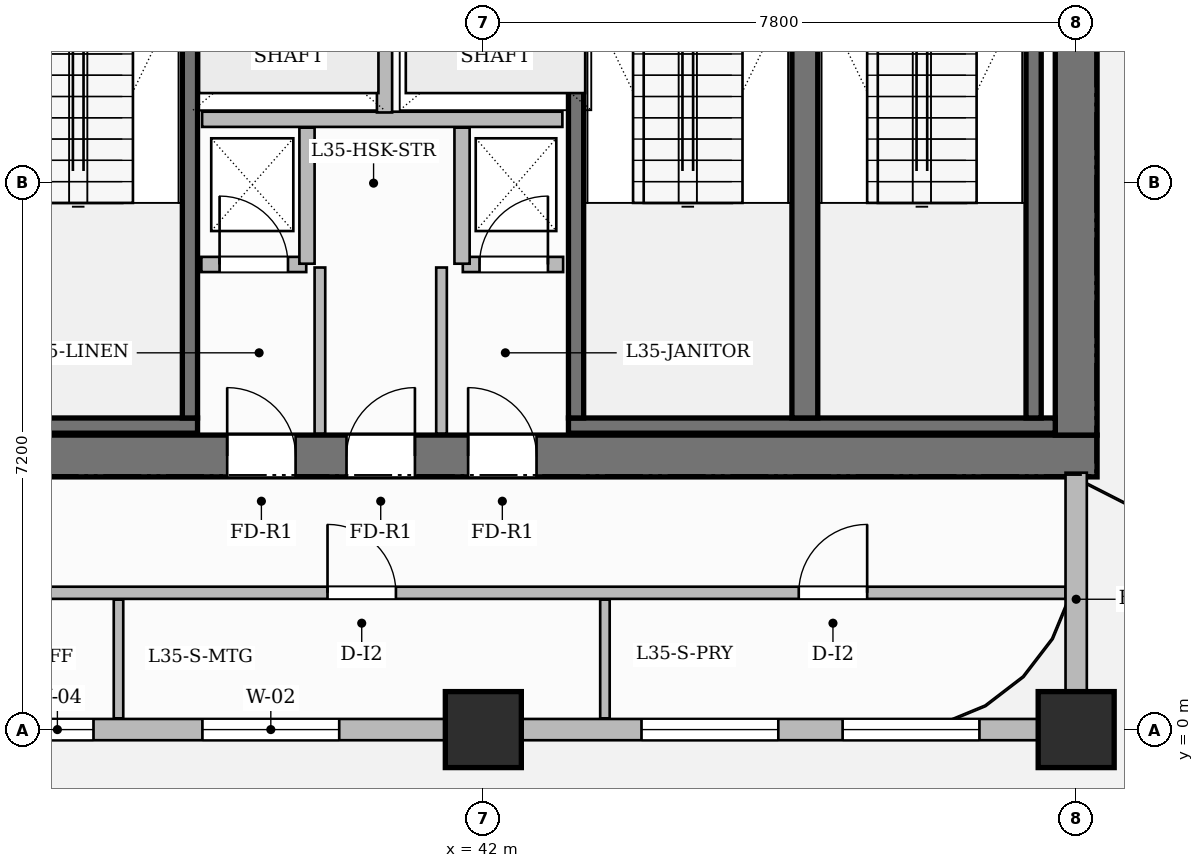
"""IFC4 building model, lengths in metres.
Left out: names, types, materials, properties, quantities, classifications, styles, units other than length and angle.
Written with IfcOpenShell. Run it as: python <this file> out.ifc"""

import sys

from ifc_helpers import new_model, si_unit, direction, frame, frame_2d, origin, origin_2d, place, context, subcontext, project, spatial, rectangle, extrude, source, transform, mapped, element, fill, save


model = new_model("IFC4")
c1 = context("Model", 3, precision=1e-05, world=origin(), true_north=direction((0.0, 1.0)))
c2 = subcontext(c1, "Body", "Model", "MODEL_VIEW")
j1 = project(units=[si_unit("LENGTHUNIT", "METRE"), si_unit("PLANEANGLEUNIT", "RADIAN")], contexts=[c1])
p1 = place(None, origin())
s1 = spatial("IfcSite", under=j1, at=p1, CompositionType="ELEMENT")
p2 = place(p1, origin())
s2 = spatial("IfcBuilding", under=s1, at=p2, CompositionType="ELEMENT")
p3 = place(p2, frame((0.0, 0.0, 141.4)))
s3 = spatial("IfcBuildingStorey", under=s2, at=p3, CompositionType="ELEMENT", Elevation=141.4)
p4 = place(p3, frame((34.525, 3.6, 0.0), z_axis=(0.0, 0.0, 1.0), x_axis=(1.0, 0.0, 0.0)))
e1 = element("IfcWall", 1, at=p4, inside=s3, PredefinedType="SHEAR", context=c2, shape_type="SweptSolid", body=[
    extrude(rectangle(XDim=15.55, YDim=0.55, at=frame_2d((7.775, 0.0))), origin(), (0.0, 0.0, 1.0), 3.7),
])
p5 = place(p4, frame((4.105, 0.0, 0.0)))
e2 = element("IfcOpeningElement", 2, at=p5, cuts=e1, PredefinedType="OPENING", context=c2, shape_type="SweptSolid", body=[
    extrude(rectangle(XDim=0.9, YDim=2.1, at=frame_2d((0.45, 1.05))), frame((0.0, 0.285, 0.0), z_axis=(0.0, -1.0, 0.0), x_axis=(1.0, 0.0, 0.0)), (0.0, 0.0, 1.0), 0.57),
])
p6 = place(p4, frame((5.675, 0.0, 0.0)))
e3 = element("IfcOpeningElement", 3, at=p6, cuts=e1, PredefinedType="OPENING", context=c2, shape_type="SweptSolid", body=[
    extrude(rectangle(XDim=0.9, YDim=2.1, at=frame_2d((0.45, 1.05))), frame((0.0, 0.285, 0.0), z_axis=(0.0, -1.0, 0.0), x_axis=(1.0, 0.0, 0.0)), (0.0, 0.0, 1.0), 0.57),
])
p7 = place(p4, frame((7.275, 0.0, 0.0)))
e4 = element("IfcOpeningElement", 4, at=p7, cuts=e1, PredefinedType="OPENING", context=c2, shape_type="SweptSolid", body=[
    extrude(rectangle(XDim=0.9, YDim=2.1, at=frame_2d((0.45, 1.05))), frame((0.0, 0.285, 0.0), z_axis=(0.0, -1.0, 0.0), x_axis=(1.0, 0.0, 0.0)), (0.0, 0.0, 1.0), 0.57),
])
p8 = place(p3, frame((49.8, 3.875, 0.0), z_axis=(0.0, 0.0, 1.0), x_axis=(0.0, 1.0, 0.0)))
e5 = element("IfcWall", 5, at=p8, inside=s3, PredefinedType="SHEAR", context=c2, shape_type="SweptSolid", body=[
    extrude(rectangle(XDim=10.25, YDim=0.55, at=frame_2d((5.125, 0.0))), origin(), (0.0, 0.0, 1.0), 3.7),
])
m1 = source(origin(), c2, "Body", "SweptSolid", [
    extrude(rectangle(XDim=1.0, YDim=1.0, at=origin_2d()), origin(), (0.0, 0.0, 1.0), 3.7),
])
for number, where, z_axis, x_axis in (
    (6, (42.0, 0.0, 0.0), (0.0, 0.0, 1.0), (1.0, 0.0, 0.0)),
    (7, (49.8, 0.0, 0.0), (0.0, 0.0, 1.0), (1.0, 0.0, 0.0)),
):
    element("IfcColumn", number, at=place(p3, frame(where, z_axis=z_axis, x_axis=x_axis)), inside=s3, PredefinedType="COLUMN", context=c2, shape_type="MappedRepresentation", body=[
        mapped(m1, transform((0.0, 0.0, 0.0), scale=1.0)),
    ])
p9 = place(p3, frame((35.075, 4.0, 0.0), z_axis=(0.0, 0.0, 1.0), x_axis=(1.0, 0.0, 0.0)))
e8 = element("IfcWall", 8, at=p9, inside=s3, PredefinedType="SHEAR", context=c2, shape_type="SweptSolid", body=[
    extrude(rectangle(XDim=3.165, YDim=0.2, at=frame_2d((1.583, 0.0))), origin(), (0.0, 0.0, 1.0), 3.7),
])
p10 = place(p3, frame((38.14, 4.1, 0.0), z_axis=(0.0, 0.0, 1.0), x_axis=(0.0, 1.0, 0.0)))
e9 = element("IfcWall", 9, at=p10, inside=s3, PredefinedType="SHEAR", context=c2, shape_type="SweptSolid", body=[
    extrude(rectangle(XDim=6.95, YDim=0.2, at=frame_2d((3.475, 0.0))), origin(), (0.0, 0.0, 1.0), 3.7),
])
p11 = place(p3, frame((43.12, 4.0, 0.0), z_axis=(0.0, 0.0, 1.0), x_axis=(1.0, 0.0, 0.0)))
e10 = element("IfcWall", 10, at=p11, inside=s3, PredefinedType="SHEAR", context=c2, shape_type="SweptSolid", body=[
    extrude(rectangle(XDim=6.405, YDim=0.2, at=frame_2d((3.202, 0.0))), origin(), (0.0, 0.0, 1.0), 3.7),
])
p12 = place(p3, frame((43.22, 4.1, 0.0), z_axis=(0.0, 0.0, 1.0), x_axis=(0.0, 1.0, 0.0)))
e11 = element("IfcWall", 11, at=p12, inside=s3, PredefinedType="SHEAR", context=c2, shape_type="SweptSolid", body=[
    extrude(rectangle(XDim=6.95, YDim=0.2, at=frame_2d((3.475, 0.0))), origin(), (0.0, 0.0, 1.0), 3.7),
])
p13 = place(p3, frame((46.23, 4.1, 0.0), z_axis=(0.0, 0.0, 1.0), x_axis=(0.0, 1.0, 0.0)))
e12 = element("IfcWall", 12, at=p13, inside=s3, PredefinedType="SHEAR", context=c2, shape_type="SweptSolid", body=[
    extrude(rectangle(XDim=6.95, YDim=0.34, at=frame_2d((3.475, 0.0))), origin(), (0.0, 0.0, 1.0), 3.7),
])
p14 = place(p3, frame((49.24, 4.1, 0.0), z_axis=(0.0, 0.0, 1.0), x_axis=(0.0, 1.0, 0.0)))
e13 = element("IfcWall", 13, at=p14, inside=s3, PredefinedType="SHEAR", context=c2, shape_type="SweptSolid", body=[
    extrude(rectangle(XDim=6.95, YDim=0.2, at=frame_2d((3.475, 0.0))), origin(), (0.0, 0.0, 1.0), 3.7),
])
p15 = place(p3, frame((38.3, 8.03, 0.0), z_axis=(0.0, 0.0, 1.0), x_axis=(1.0, 0.0, 0.0)))
e14 = element("IfcWall", 14, at=p15, inside=s3, PredefinedType="PARTITIONING", context=c2, shape_type="SweptSolid", body=[
    extrude(rectangle(XDim=4.74, YDim=0.2, at=frame_2d((2.37, 0.0))), origin(), (0.0, 0.0, 1.0), 3.4),
])
p16 = place(p3, frame((40.7, 8.12, 0.0), z_axis=(0.0, 0.0, 1.0), x_axis=(0.0, 1.0, 0.0)))
e15 = element("IfcWall", 15, at=p16, inside=s3, PredefinedType="PARTITIONING", context=c2, shape_type="SweptSolid", body=[
    extrude(rectangle(XDim=2.18, YDim=0.2, at=frame_2d((1.09, 0.0))), origin(), (0.0, 0.0, 1.0), 3.4),
])
p17 = place(p3, frame((38.29, 6.12, 0.0), z_axis=(0.0, 0.0, 1.0), x_axis=(1.0, 0.0, 0.0)))
e16 = element("IfcWall", 16, at=p17, inside=s3, PredefinedType="PARTITIONING", context=c2, shape_type="SweptSolid", body=[
    extrude(rectangle(XDim=1.38, YDim=0.2, at=frame_2d((0.69, 0.0))), origin(), (0.0, 0.0, 1.0), 3.4),
])
p18 = place(p17, frame((0.24, 0.0, 0.0)))
e17 = element("IfcOpeningElement", 17, at=p18, cuts=e16, PredefinedType="OPENING", context=c2, shape_type="SweptSolid", body=[
    extrude(rectangle(XDim=0.9, YDim=2.1, at=frame_2d((0.45, 1.05))), frame((0.0, 0.11, 0.0), z_axis=(0.0, -1.0, 0.0), x_axis=(1.0, 0.0, 0.0)), (0.0, 0.0, 1.0), 0.22),
])
p19 = place(p3, frame((39.68, 6.13, 0.0), z_axis=(0.0, 0.0, 1.0), x_axis=(0.0, 1.0, 0.0)))
e18 = element("IfcWall", 18, at=p19, inside=s3, PredefinedType="PARTITIONING", context=c2, shape_type="SweptSolid", body=[
    extrude(rectangle(XDim=1.79, YDim=0.2, at=frame_2d((0.895, 0.0))), origin(), (0.0, 0.0, 1.0), 3.4),
])
p20 = place(p3, frame((41.73, 6.12, 0.0), z_axis=(0.0, 0.0, 1.0), x_axis=(1.0, 0.0, 0.0)))
e19 = element("IfcWall", 19, at=p20, inside=s3, PredefinedType="PARTITIONING", context=c2, shape_type="SweptSolid", body=[
    extrude(rectangle(XDim=1.32, YDim=0.2, at=frame_2d((0.66, 0.0))), origin(), (0.0, 0.0, 1.0), 3.4),
])
p21 = place(p20, frame((0.22, 0.0, 0.0)))
e20 = element("IfcOpeningElement", 20, at=p21, cuts=e19, PredefinedType="OPENING", context=c2, shape_type="SweptSolid", body=[
    extrude(rectangle(XDim=0.9, YDim=2.1, at=frame_2d((0.45, 1.05))), frame((0.0, 0.11, 0.0), z_axis=(0.0, -1.0, 0.0), x_axis=(1.0, 0.0, 0.0)), (0.0, 0.0, 1.0), 0.22),
])
p22 = place(p3, frame((41.72, 6.13, 0.0), z_axis=(0.0, 0.0, 1.0), x_axis=(0.0, 1.0, 0.0)))
e21 = element("IfcWall", 21, at=p22, inside=s3, PredefinedType="PARTITIONING", context=c2, shape_type="SweptSolid", body=[
    extrude(rectangle(XDim=1.79, YDim=0.2, at=frame_2d((0.895, 0.0))), origin(), (0.0, 0.0, 1.0), 3.4),
])
for number, where, z_axis, x_axis in (
    (22, (39.85, 3.895, 0.0), (0.0, 0.0, 1.0), (0.0, 1.0, 0.0)),
    (23, (41.45, 3.895, 0.0), (0.0, 0.0, 1.0), (0.0, 1.0, 0.0)),
):
    element("IfcWall", number, at=place(p3, frame(where, z_axis=z_axis, x_axis=x_axis)), inside=s3, PredefinedType="PARTITIONING", context=c2, shape_type="SweptSolid", body=[
        extrude(rectangle(XDim=2.185, YDim=0.14, at=frame_2d((1.093, 0.0))), origin(), (0.0, 0.0, 1.0), 3.4),
    ])
p23 = place(p3, frame((30.29, 1.8, 0.0), z_axis=(0.0, 0.0, 1.0), x_axis=(1.0, 0.0, 0.0)))
e24 = element("IfcWall", 24, at=p23, inside=s3, PredefinedType="PARTITIONING", context=c2, shape_type="SweptSolid", body=[
    extrude(rectangle(XDim=19.37, YDim=0.16, at=frame_2d((9.685, 0.0))), origin(), (0.0, 0.0, 1.0), 3.4),
])
p24 = place(p23, frame((2.916, 0.0, 0.0)))
e25 = element("IfcOpeningElement", 25, at=p24, cuts=e24, PredefinedType="OPENING", context=c2, shape_type="SweptSolid", body=[
    extrude(rectangle(XDim=0.9, YDim=2.15, at=frame_2d((0.45, 1.075))), frame((0.0, 0.09, 0.0), z_axis=(0.0, -1.0, 0.0), x_axis=(1.0, 0.0, 0.0)), (0.0, 0.0, 1.0), 0.18),
])
p25 = place(p23, frame((9.66, 0.0, 0.0)))
e26 = element("IfcOpeningElement", 26, at=p25, cuts=e24, PredefinedType="OPENING", context=c2, shape_type="SweptSolid", body=[
    extrude(rectangle(XDim=0.9, YDim=2.15, at=frame_2d((0.45, 1.075))), frame((0.0, 0.09, 0.0), z_axis=(0.0, -1.0, 0.0), x_axis=(1.0, 0.0, 0.0)), (0.0, 0.0, 1.0), 0.18),
])
p26 = place(p23, frame((15.86, 0.0, 0.0)))
e27 = element("IfcOpeningElement", 27, at=p26, cuts=e24, PredefinedType="OPENING", context=c2, shape_type="SweptSolid", body=[
    extrude(rectangle(XDim=0.9, YDim=2.15, at=frame_2d((0.45, 1.075))), frame((0.0, 0.09, 0.0), z_axis=(0.0, -1.0, 0.0), x_axis=(1.0, 0.0, 0.0)), (0.0, 0.0, 1.0), 0.18),
])
for number, where, z_axis, x_axis in (
    (28, (37.2, 0.148, 0.0), (0.0, 0.0, 1.0), (0.0, 1.0, 0.0)),
    (29, (43.6, 0.148, 0.0), (0.0, 0.0, 1.0), (0.0, 1.0, 0.0)),
):
    element("IfcWall", number, at=place(p3, frame(where, z_axis=z_axis, x_axis=x_axis)), inside=s3, PredefinedType="PARTITIONING", context=c2, shape_type="SweptSolid", body=[
        extrude(rectangle(XDim=1.562, YDim=0.125, at=frame_2d((0.781, 0.0))), origin(), (0.0, 0.0, 1.0), 3.4),
    ])
p27 = place(p3, frame((14.4, 0.0, 0.0), z_axis=(0.0, 0.0, 1.0), x_axis=(1.0, 0.0, 0.0)))
e30 = element("IfcWall", 30, at=p27, inside=s3, PredefinedType="SOLIDWALL", context=c2, shape_type="SweptSolid", body=[
    extrude(rectangle(XDim=35.4, YDim=0.28, at=frame_2d((17.7, 0.0))), origin(), (0.0, 0.0, 1.0), 2.885),
])
p28 = place(p27, frame((0.85, 0.0, 0.0)))
e31 = element("IfcOpeningElement", 31, at=p28, cuts=e30, PredefinedType="OPENING", context=c2, shape_type="SweptSolid", body=[
    extrude(rectangle(XDim=1.2, YDim=2.2, at=frame_2d((0.6, 1.1))), frame((0.0, 0.15, 0.0), z_axis=(0.0, -1.0, 0.0), x_axis=(1.0, 0.0, 0.0)), (0.0, 0.0, 1.0), 0.3),
])
p29 = place(p27, frame((4.154, 0.0, 0.8)))
e32 = element("IfcOpeningElement", 32, at=p29, cuts=e30, PredefinedType="OPENING", context=c2, shape_type="SweptSolid", body=[
    extrude(rectangle(XDim=1.8, YDim=1.85, at=frame_2d((0.9, 0.925))), frame((0.0, 0.15, 0.0), z_axis=(0.0, -1.0, 0.0), x_axis=(1.0, 0.0, 0.0)), (0.0, 0.0, 1.0), 0.3),
])
p30 = place(p27, frame((8.181, 0.0, 0.8)))
e33 = element("IfcOpeningElement", 33, at=p30, cuts=e30, PredefinedType="OPENING", context=c2, shape_type="SweptSolid", body=[
    extrude(rectangle(XDim=0.95, YDim=1.75, at=frame_2d((0.475, 0.875))), frame((0.0, 0.15, 0.0), z_axis=(0.0, -1.0, 0.0), x_axis=(1.0, 0.0, 0.0)), (0.0, 0.0, 1.0), 0.3),
])
p31 = place(p27, frame((9.9, 0.0, 0.8)))
e34 = element("IfcOpeningElement", 34, at=p31, cuts=e30, PredefinedType="OPENING", context=c2, shape_type="SweptSolid", body=[
    extrude(rectangle(XDim=1.8, YDim=1.85, at=frame_2d((0.9, 0.925))), frame((0.0, 0.15, 0.0), z_axis=(0.0, -1.0, 0.0), x_axis=(1.0, 0.0, 0.0)), (0.0, 0.0, 1.0), 0.3),
])
p32 = place(p27, frame((12.469, 0.0, 0.8)))
e35 = element("IfcOpeningElement", 35, at=p32, cuts=e30, PredefinedType="OPENING", context=c2, shape_type="SweptSolid", body=[
    extrude(rectangle(XDim=0.95, YDim=1.75, at=frame_2d((0.475, 0.875))), frame((0.0, 0.15, 0.0), z_axis=(0.0, -1.0, 0.0), x_axis=(1.0, 0.0, 0.0)), (0.0, 0.0, 1.0), 0.3),
])
p33 = place(p27, frame((16.804, 0.0, 0.8)))
e36 = element("IfcOpeningElement", 36, at=p33, cuts=e30, PredefinedType="OPENING", context=c2, shape_type="SweptSolid", body=[
    extrude(rectangle(XDim=1.8, YDim=1.85, at=frame_2d((0.9, 0.925))), frame((0.0, 0.15, 0.0), z_axis=(0.0, -1.0, 0.0), x_axis=(1.0, 0.0, 0.0)), (0.0, 0.0, 1.0), 0.3),
])
p34 = place(p27, frame((21.521, 0.0, 0.8)))
e37 = element("IfcOpeningElement", 37, at=p34, cuts=e30, PredefinedType="OPENING", context=c2, shape_type="SweptSolid", body=[
    extrude(rectangle(XDim=0.95, YDim=1.75, at=frame_2d((0.475, 0.875))), frame((0.0, 0.15, 0.0), z_axis=(0.0, -1.0, 0.0), x_axis=(1.0, 0.0, 0.0)), (0.0, 0.0, 1.0), 0.3),
])
p35 = place(p27, frame((23.904, 0.0, 0.8)))
e38 = element("IfcOpeningElement", 38, at=p35, cuts=e30, PredefinedType="OPENING", context=c2, shape_type="SweptSolid", body=[
    extrude(rectangle(XDim=1.8, YDim=1.85, at=frame_2d((0.9, 0.925))), frame((0.0, 0.15, 0.0), z_axis=(0.0, -1.0, 0.0), x_axis=(1.0, 0.0, 0.0)), (0.0, 0.0, 1.0), 0.3),
])
p36 = place(p27, frame((29.681, 0.0, 0.8)))
e39 = element("IfcOpeningElement", 39, at=p36, cuts=e30, PredefinedType="OPENING", context=c2, shape_type="SweptSolid", body=[
    extrude(rectangle(XDim=1.8, YDim=1.85, at=frame_2d((0.9, 0.925))), frame((0.0, 0.15, 0.0), z_axis=(0.0, -1.0, 0.0), x_axis=(1.0, 0.0, 0.0)), (0.0, 0.0, 1.0), 0.3),
])
p37 = place(p27, frame((32.327, 0.0, 0.8)))
e40 = element("IfcOpeningElement", 40, at=p37, cuts=e30, PredefinedType="OPENING", context=c2, shape_type="SweptSolid", body=[
    extrude(rectangle(XDim=1.8, YDim=1.85, at=frame_2d((0.9, 0.925))), frame((0.0, 0.15, 0.0), z_axis=(0.0, -1.0, 0.0), x_axis=(1.0, 0.0, 0.0)), (0.0, 0.0, 1.0), 0.3),
])
p38 = place(p3, frame((49.8, 0.05, 0.0), z_axis=(0.0, 0.0, 1.0), x_axis=(0.0, 1.0, 0.0)))
e41 = element("IfcWall", 41, at=p38, inside=s3, PredefinedType="SOLIDWALL", context=c2, shape_type="SweptSolid", body=[
    extrude(rectangle(XDim=3.33, YDim=0.28, at=frame_2d((1.665, 0.0))), origin(), (0.0, 0.0, 1.0), 3.4),
])
m2 = source(origin(), c2, "Body", "SweptSolid", [
    extrude(rectangle(XDim=0.9, YDim=2.1, at=frame_2d((0.45, 1.05))), frame((0.0, 0.025, 0.0), z_axis=(0.0, -1.0, 0.0), x_axis=(1.0, 0.0, 0.0)), (0.0, 0.0, 1.0), 0.05),
])
p39 = place(p18, origin())
e42 = element("IfcDoor", 42, at=p39, inside=s3, OperationType="SINGLE_SWING_LEFT", PredefinedType="DOOR", context=c2, shape_type="MappedRepresentation", body=[
    mapped(m2, transform((0.0, 0.0, 0.0), scale=1.0)),
])
fill(e17, e42)
p40 = place(p21, origin())
e43 = element("IfcDoor", 43, at=p40, inside=s3, OperationType="SINGLE_SWING_RIGHT", PredefinedType="DOOR", context=c2, shape_type="MappedRepresentation", body=[
    mapped(m2, transform((0.0, 0.0, 0.0), scale=1.0)),
])
fill(e20, e43)
p41 = place(p5, origin())
e44 = element("IfcDoor", 44, at=p41, inside=s3, OperationType="SINGLE_SWING_LEFT", PredefinedType="DOOR", context=c2, shape_type="MappedRepresentation", body=[
    mapped(m2, transform((0.0, 0.0, 0.0), scale=1.0)),
])
fill(e2, e44)
p42 = place(p6, origin())
e45 = element("IfcDoor", 45, at=p42, inside=s3, OperationType="SINGLE_SWING_RIGHT", PredefinedType="DOOR", context=c2, shape_type="MappedRepresentation", body=[
    mapped(m2, transform((0.0, 0.0, 0.0), scale=1.0)),
])
fill(e3, e45)
p43 = place(p7, origin())
e46 = element("IfcDoor", 46, at=p43, inside=s3, OperationType="SINGLE_SWING_LEFT", PredefinedType="DOOR", context=c2, shape_type="MappedRepresentation", body=[
    mapped(m2, transform((0.0, 0.0, 0.0), scale=1.0)),
])
fill(e4, e46)
m3 = source(origin(), c2, "Body", "SweptSolid", [
    extrude(rectangle(XDim=0.9, YDim=2.15, at=frame_2d((0.45, 1.075))), frame((0.0, 0.025, 0.0), z_axis=(0.0, -1.0, 0.0), x_axis=(1.0, 0.0, 0.0)), (0.0, 0.0, 1.0), 0.05),
])
p44 = place(p25, origin())
e47 = element("IfcDoor", 47, at=p44, inside=s3, OperationType="SINGLE_SWING_LEFT", PredefinedType="DOOR", context=c2, shape_type="MappedRepresentation", body=[
    mapped(m3, transform((0.0, 0.0, 0.0), scale=1.0)),
])
fill(e26, e47)
p45 = place(p26, origin())
e48 = element("IfcDoor", 48, at=p45, inside=s3, OperationType="SINGLE_SWING_RIGHT", PredefinedType="DOOR", context=c2, shape_type="MappedRepresentation", body=[
    mapped(m3, transform((0.0, 0.0, 0.0), scale=1.0)),
])
fill(e27, e48)
m4 = source(origin(), c2, "Body", "SweptSolid", [
    extrude(rectangle(XDim=0.95, YDim=1.75, at=frame_2d((0.475, 0.875))), frame((0.0, 0.03, 0.0), z_axis=(0.0, -1.0, 0.0), x_axis=(1.0, 0.0, 0.0)), (0.0, 0.0, 1.0), 0.06),
])
p46 = place(p34, origin())
e49 = element("IfcWindow", 49, at=p46, inside=s3, PartitioningType="SINGLE_PANEL", PredefinedType="WINDOW", context=c2, shape_type="MappedRepresentation", body=[
    mapped(m4, transform((0.0, 0.0, 0.0), scale=1.0)),
])
fill(e37, e49)
m5 = source(origin(), c2, "Body", "SweptSolid", [
    extrude(rectangle(XDim=1.8, YDim=1.85, at=frame_2d((0.9, 0.925))), frame((0.0, 0.03, 0.0), z_axis=(0.0, -1.0, 0.0), x_axis=(1.0, 0.0, 0.0)), (0.0, 0.0, 1.0), 0.06),
])
p47 = place(p35, origin())
e50 = element("IfcWindow", 50, at=p47, inside=s3, PartitioningType="DOUBLE_PANEL_VERTICAL", PredefinedType="WINDOW", context=c2, shape_type="MappedRepresentation", body=[
    mapped(m5, transform((0.0, 0.0, 0.0), scale=1.0)),
])
fill(e38, e50)
p48 = place(p36, origin())
e51 = element("IfcWindow", 51, at=p48, inside=s3, PartitioningType="DOUBLE_PANEL_VERTICAL", PredefinedType="WINDOW", context=c2, shape_type="MappedRepresentation", body=[
    mapped(m5, transform((0.0, 0.0, 0.0), scale=1.0)),
])
fill(e39, e51)
p49 = place(p37, origin())
e52 = element("IfcWindow", 52, at=p49, inside=s3, PartitioningType="DOUBLE_PANEL_VERTICAL", PredefinedType="WINDOW", context=c2, shape_type="MappedRepresentation", body=[
    mapped(m5, transform((0.0, 0.0, 0.0), scale=1.0)),
])
fill(e40, e52)
save(model, sys.argv[1])
